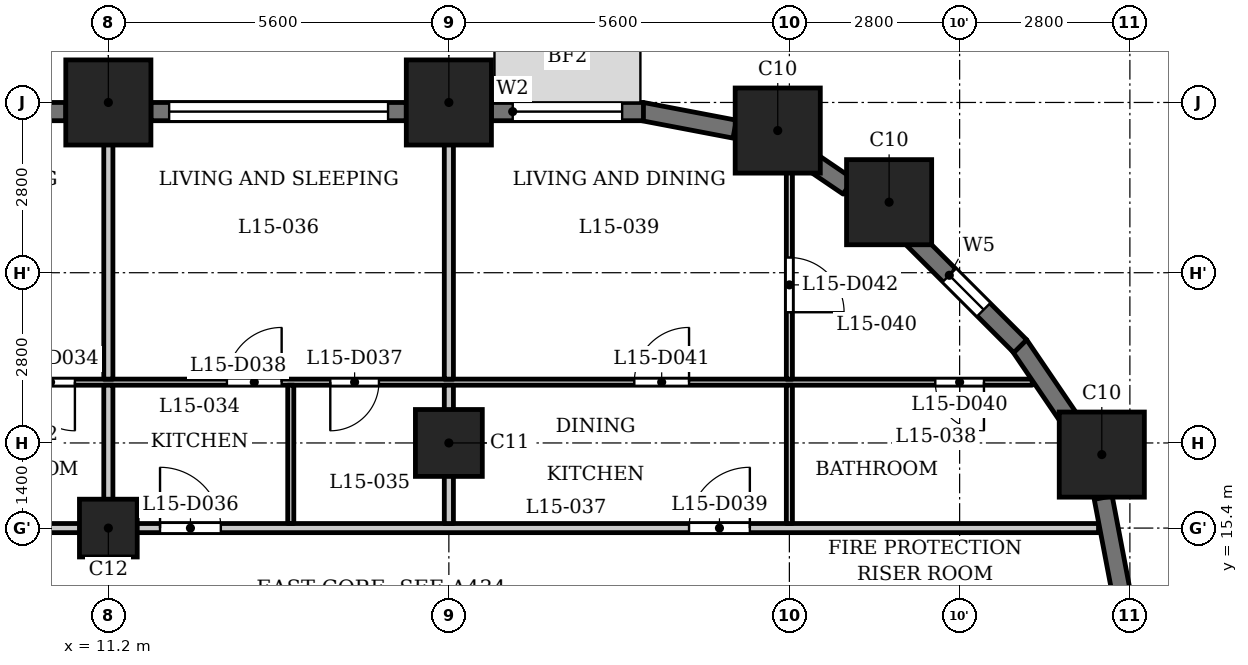
"""IFC4 building model, lengths in metres.
Left out: names, types, materials, properties, quantities, classifications, styles, units other than length and angle.
Written with IfcOpenShell. Run it as: python <this file> out.ifc"""

import sys

from ifc_helpers import new_model, si_unit, direction, frame, frame_2d, origin, origin_2d, place, context, subcontext, project, spatial, rectangle, extrude, element, fill, save


model = new_model("IFC4")
c1 = context("Model", 3, precision=1e-05, world=origin(), true_north=direction((0.0, 1.0)))
c2 = subcontext(c1, "Body", "Model", "MODEL_VIEW")
j1 = project(units=[si_unit("LENGTHUNIT", "METRE"), si_unit("PLANEANGLEUNIT", "RADIAN")], contexts=[c1])
p1 = place(None, origin())
s1 = spatial("IfcSite", under=j1, at=p1, CompositionType="ELEMENT")
p2 = place(p1, origin())
s2 = spatial("IfcBuilding", under=s1, at=p2, CompositionType="ELEMENT")
p3 = place(p2, frame((0.0, 0.0, 62.0)))
s3 = spatial("IfcBuildingStorey", under=s2, at=p3, CompositionType="ELEMENT", Elevation=62.0)
for number, where, z_axis, x_axis in (
    (1, (27.538, 16.609, 0.0), (0.0, 0.0, 1.0), (1.0, 0.0, 0.0)),
    (2, (24.04, 20.76, 0.0), (0.0, 0.0, 1.0), (1.0, 0.0, 0.0)),
    (3, (22.209, 21.938, 0.0), (0.0, 0.0, 1.0), (1.0, 0.0, 0.0)),
    (4, (16.8, 22.4, 0.0), (0.0, 0.0, 1.0), (1.0, 0.0, 0.0)),
    (5, (11.2, 22.4, 0.0), (0.0, 0.0, 1.0), (1.0, 0.0, 0.0)),
):
    element("IfcColumn", number, at=place(p3, frame(where, z_axis=z_axis, x_axis=x_axis)), inside=s3, PredefinedType="COLUMN", context=c2, shape_type="SweptSolid", body=[
        extrude(rectangle(XDim=1.4, YDim=1.4, at=origin_2d()), origin(), (0.0, 0.0, 1.0), 3.5),
    ])
p4 = place(p3, frame((16.8, 16.8, 0.0), z_axis=(0.0, 0.0, 1.0), x_axis=(1.0, 0.0, 0.0)))
e6 = element("IfcColumn", 6, at=p4, inside=s3, PredefinedType="COLUMN", context=c2, shape_type="SweptSolid", body=[
    extrude(rectangle(XDim=1.1, YDim=1.1, at=origin_2d()), origin(), (0.0, 0.0, 1.0), 3.5),
])
p5 = place(p3, frame((11.2, 15.4, 0.0), z_axis=(0.0, 0.0, 1.0), x_axis=(1.0, 0.0, 0.0)))
e7 = element("IfcColumn", 7, at=p5, inside=s3, PredefinedType="COLUMN", context=c2, shape_type="SweptSolid", body=[
    extrude(rectangle(XDim=0.95, YDim=0.95, at=origin_2d()), origin(), (0.0, 0.0, 1.0), 3.5),
])
for number, where, z_axis, x_axis in (
    (8, (27.853, 14.372, 0.0), (0.0, 0.0, 1.0), (-0.187, 0.982, 0.0)),
    (9, (27.053, 17.126, 0.0), (0.0, 0.0, 1.0), (-0.562, 0.827, 0.0)),
):
    element("IfcWall", number, at=place(p3, frame(where, z_axis=z_axis, x_axis=x_axis)), inside=s3, PredefinedType="SOLIDWALL", context=c2, shape_type="SweptSolid", body=[
        extrude(rectangle(XDim=1.556, YDim=0.3, at=frame_2d((0.778, 0.0))), origin(), (0.0, 0.0, 1.0), 2.35),
    ])
p6 = place(p3, frame((26.197, 18.391, 0.0), z_axis=(0.0, 0.0, 1.0), x_axis=(-0.707057949532, 0.707155609469, 0.0)))
e10 = element("IfcWall", 10, at=p6, inside=s3, PredefinedType="SOLIDWALL", context=c2, shape_type="SweptSolid", body=[
    extrude(rectangle(XDim=2.5, YDim=0.3, at=frame_2d((1.25, 0.0))), origin(), (0.0, 0.0, 1.0), 2.35),
])
p7 = place(p6, frame((0.85, 0.0, 0.6)))
e11 = element("IfcOpeningElement", 11, at=p7, cuts=e10, PredefinedType="OPENING", context=c2, shape_type="SweptSolid", body=[
    extrude(rectangle(XDim=0.8, YDim=1.55, at=frame_2d((0.4, 0.775))), frame((0.0, 0.16, 0.0), z_axis=(0.0, -1.0, 0.0), x_axis=(1.0, 0.0, 0.0)), (0.0, 0.0, 1.0), 0.32),
])
p8 = place(p3, frame((23.368, 21.017, 0.0), z_axis=(0.0, 0.0, 1.0), x_axis=(-0.827037530089, 0.562146710232, 0.0)))
e12 = element("IfcWall", 12, at=p8, inside=s3, PredefinedType="SOLIDWALL", context=c2, shape_type="SweptSolid", body=[
    extrude(rectangle(XDim=0.777, YDim=0.3, at=frame_2d((0.388, 0.0))), origin(), (0.0, 0.0, 1.0), 3.2),
])
p9 = place(p3, frame((21.5, 21.961, 0.0), z_axis=(0.0, 0.0, 1.0), x_axis=(-0.982297345734, 0.187328386968, 0.0)))
e13 = element("IfcWall", 13, at=p9, inside=s3, PredefinedType="SOLIDWALL", context=c2, shape_type="SweptSolid", body=[
    extrude(rectangle(XDim=1.556, YDim=0.3, at=frame_2d((0.778, 0.0))), origin(), (0.0, 0.0, 1.0), 2.35),
])
p10 = place(p3, frame((20.0, 22.25, 0.0), z_axis=(0.0, 0.0, 1.0), x_axis=(-1.0, 0.0, 0.0)))
e14 = element("IfcWall", 14, at=p10, inside=s3, PredefinedType="SOLIDWALL", context=c2, shape_type="SweptSolid", body=[
    extrude(rectangle(XDim=2.5, YDim=0.3, at=frame_2d((1.25, 0.0))), origin(), (0.0, 0.0, 1.0), 2.35),
])
p11 = place(p10, frame((0.35, 0.0, 0.9)))
e15 = element("IfcOpeningElement", 15, at=p11, cuts=e14, PredefinedType="OPENING", context=c2, shape_type="SweptSolid", body=[
    extrude(rectangle(XDim=1.8, YDim=1.25, at=frame_2d((0.9, 0.625))), frame((0.0, 0.16, 0.0), z_axis=(0.0, -1.0, 0.0), x_axis=(1.0, 0.0, 0.0)), (0.0, 0.0, 1.0), 0.32),
])
p12 = place(p3, frame((16.1, 22.25, 0.0), z_axis=(0.0, 0.0, 1.0), x_axis=(-1.0, 0.0, 0.0)))
e16 = element("IfcWall", 16, at=p12, inside=s3, PredefinedType="SOLIDWALL", context=c2, shape_type="SweptSolid", body=[
    extrude(rectangle(XDim=4.2, YDim=0.3, at=frame_2d((2.1, 0.0))), origin(), (0.0, 0.0, 1.0), 2.35),
])
p13 = place(p12, frame((0.3, 0.0, 1.2)))
e17 = element("IfcOpeningElement", 17, at=p13, cuts=e16, PredefinedType="OPENING", context=c2, shape_type="SweptSolid", body=[
    extrude(rectangle(XDim=3.6, YDim=0.95, at=frame_2d((1.8, 0.475))), frame((0.0, 0.16, 0.0), z_axis=(0.0, -1.0, 0.0), x_axis=(1.0, 0.0, 0.0)), (0.0, 0.0, 1.0), 0.32),
])
p14 = place(p3, frame((10.5, 22.25, 0.0), z_axis=(0.0, 0.0, 1.0), x_axis=(-1.0, 0.0, 0.0)))
e18 = element("IfcWall", 18, at=p14, inside=s3, PredefinedType="SOLIDWALL", context=c2, shape_type="SweptSolid", body=[
    extrude(rectangle(XDim=4.2, YDim=0.3, at=frame_2d((2.1, 0.0))), origin(), (0.0, 0.0, 1.0), 2.35),
])
p15 = place(p14, frame((0.3, 0.0, 1.2)))
e19 = element("IfcOpeningElement", 19, at=p15, cuts=e18, PredefinedType="OPENING", context=c2, shape_type="SweptSolid", body=[
    extrude(rectangle(XDim=3.6, YDim=0.95, at=frame_2d((1.8, 0.475))), frame((0.0, 0.16, 0.0), z_axis=(0.0, -1.0, 0.0), x_axis=(1.0, 0.0, 0.0)), (0.0, 0.0, 1.0), 0.32),
])
p16 = place(p3, frame((-27.484, 15.4, 0.0), z_axis=(0.0, 0.0, 1.0), x_axis=(1.0, 0.0, 0.0)))
e20 = element("IfcWall", 20, at=p16, inside=s3, PredefinedType="PARTITIONING", context=c2, shape_type="SweptSolid", body=[
    extrude(rectangle(XDim=54.968, YDim=0.15, at=frame_2d((27.484, 0.0))), origin(), (0.0, 0.0, 1.0), 3.2),
])
p17 = place(p16, frame((8.784, 0.0, 0.0)))
e21 = element("IfcOpeningElement", 21, at=p17, cuts=e20, PredefinedType="OPENING", context=c2, shape_type="SweptSolid", body=[
    extrude(rectangle(XDim=1.0, YDim=2.1, at=frame_2d((0.5, 1.05))), frame((0.0, 0.085, 0.0), z_axis=(0.0, -1.0, 0.0), x_axis=(1.0, 0.0, 0.0)), (0.0, 0.0, 1.0), 0.17),
])
p18 = place(p16, frame((14.634, 0.0, 0.0)))
e22 = element("IfcOpeningElement", 22, at=p18, cuts=e20, PredefinedType="OPENING", context=c2, shape_type="SweptSolid", body=[
    extrude(rectangle(XDim=1.0, YDim=2.1, at=frame_2d((0.5, 1.05))), frame((0.0, 0.085, 0.0), z_axis=(0.0, -1.0, 0.0), x_axis=(1.0, 0.0, 0.0)), (0.0, 0.0, 1.0), 0.17),
])
p19 = place(p16, frame((19.484, 0.0, 0.0)))
e23 = element("IfcOpeningElement", 23, at=p19, cuts=e20, PredefinedType="OPENING", context=c2, shape_type="SweptSolid", body=[
    extrude(rectangle(XDim=1.0, YDim=2.1, at=frame_2d((0.5, 1.05))), frame((0.0, 0.085, 0.0), z_axis=(0.0, -1.0, 0.0), x_axis=(1.0, 0.0, 0.0)), (0.0, 0.0, 1.0), 0.17),
])
p20 = place(p16, frame((23.634, 0.0, 0.0)))
e24 = element("IfcOpeningElement", 24, at=p20, cuts=e20, PredefinedType="OPENING", context=c2, shape_type="SweptSolid", body=[
    extrude(rectangle(XDim=1.0, YDim=2.1, at=frame_2d((0.5, 1.05))), frame((0.0, 0.085, 0.0), z_axis=(0.0, -1.0, 0.0), x_axis=(1.0, 0.0, 0.0)), (0.0, 0.0, 1.0), 0.17),
])
p21 = place(p16, frame((28.234, 0.0, 0.0)))
e25 = element("IfcOpeningElement", 25, at=p21, cuts=e20, PredefinedType="OPENING", context=c2, shape_type="SweptSolid", body=[
    extrude(rectangle(XDim=1.0, YDim=2.1, at=frame_2d((0.5, 1.05))), frame((0.0, 0.085, 0.0), z_axis=(0.0, -1.0, 0.0), x_axis=(1.0, 0.0, 0.0)), (0.0, 0.0, 1.0), 0.17),
])
p22 = place(p16, frame((33.784, 0.0, 0.0)))
e26 = element("IfcOpeningElement", 26, at=p22, cuts=e20, PredefinedType="OPENING", context=c2, shape_type="SweptSolid", body=[
    extrude(rectangle(XDim=1.0, YDim=2.1, at=frame_2d((0.5, 1.05))), frame((0.0, 0.085, 0.0), z_axis=(0.0, -1.0, 0.0), x_axis=(1.0, 0.0, 0.0)), (0.0, 0.0, 1.0), 0.17),
])
p23 = place(p16, frame((39.534, 0.0, 0.0)))
e27 = element("IfcOpeningElement", 27, at=p23, cuts=e20, PredefinedType="OPENING", context=c2, shape_type="SweptSolid", body=[
    extrude(rectangle(XDim=1.0, YDim=2.1, at=frame_2d((0.5, 1.05))), frame((0.0, 0.085, 0.0), z_axis=(0.0, -1.0, 0.0), x_axis=(1.0, 0.0, 0.0)), (0.0, 0.0, 1.0), 0.17),
])
p24 = place(p16, frame((48.234, 0.0, 0.0)))
e28 = element("IfcOpeningElement", 28, at=p24, cuts=e20, PredefinedType="OPENING", context=c2, shape_type="SweptSolid", body=[
    extrude(rectangle(XDim=1.0, YDim=2.1, at=frame_2d((0.5, 1.05))), frame((0.0, 0.085, 0.0), z_axis=(0.0, -1.0, 0.0), x_axis=(1.0, 0.0, 0.0)), (0.0, 0.0, 1.0), 0.17),
])
p25 = place(p3, frame((-26.64, 17.8, 0.0), z_axis=(0.0, 0.0, 1.0), x_axis=(1.0, 0.0, 0.0)))
e29 = element("IfcWall", 29, at=p25, inside=s3, PredefinedType="PARTITIONING", context=c2, shape_type="SweptSolid", body=[
    extrude(rectangle(XDim=53.034, YDim=0.1, at=frame_2d((26.517, 0.0))), origin(), (0.0, 0.0, 1.0), 3.2),
])
p26 = place(p25, frame((2.872, 0.0, 0.0)))
e30 = element("IfcOpeningElement", 30, at=p26, cuts=e29, PredefinedType="OPENING", context=c2, shape_type="SweptSolid", body=[
    extrude(rectangle(XDim=0.8, YDim=2.1, at=frame_2d((0.4, 1.05))), frame((0.0, 0.06, 0.0), z_axis=(0.0, -1.0, 0.0), x_axis=(1.0, 0.0, 0.0)), (0.0, 0.0, 1.0), 0.12),
])
p27 = place(p25, frame((7.04, 0.0, 0.0)))
e31 = element("IfcOpeningElement", 31, at=p27, cuts=e29, PredefinedType="OPENING", context=c2, shape_type="SweptSolid", body=[
    extrude(rectangle(XDim=0.9, YDim=2.1, at=frame_2d((0.45, 1.05))), frame((0.0, 0.06, 0.0), z_axis=(0.0, -1.0, 0.0), x_axis=(1.0, 0.0, 0.0)), (0.0, 0.0, 1.0), 0.12),
])
p28 = place(p25, frame((10.74, 0.0, 0.0)))
e32 = element("IfcOpeningElement", 32, at=p28, cuts=e29, PredefinedType="OPENING", context=c2, shape_type="SweptSolid", body=[
    extrude(rectangle(XDim=0.8, YDim=2.1, at=frame_2d((0.4, 1.05))), frame((0.0, 0.06, 0.0), z_axis=(0.0, -1.0, 0.0), x_axis=(1.0, 0.0, 0.0)), (0.0, 0.0, 1.0), 0.12),
])
p29 = place(p25, frame((12.89, 0.0, 0.0)))
e33 = element("IfcOpeningElement", 33, at=p29, cuts=e29, PredefinedType="OPENING", context=c2, shape_type="SweptSolid", body=[
    extrude(rectangle(XDim=0.9, YDim=2.1, at=frame_2d((0.45, 1.05))), frame((0.0, 0.06, 0.0), z_axis=(0.0, -1.0, 0.0), x_axis=(1.0, 0.0, 0.0)), (0.0, 0.0, 1.0), 0.12),
])
p30 = place(p25, frame((16.34, 0.0, 0.0)))
e34 = element("IfcOpeningElement", 34, at=p30, cuts=e29, PredefinedType="OPENING", context=c2, shape_type="SweptSolid", body=[
    extrude(rectangle(XDim=0.8, YDim=2.1, at=frame_2d((0.4, 1.05))), frame((0.0, 0.06, 0.0), z_axis=(0.0, -1.0, 0.0), x_axis=(1.0, 0.0, 0.0)), (0.0, 0.0, 1.0), 0.12),
])
p31 = place(p25, frame((19.74, 0.0, 0.0)))
e35 = element("IfcOpeningElement", 35, at=p31, cuts=e29, PredefinedType="OPENING", context=c2, shape_type="SweptSolid", body=[
    extrude(rectangle(XDim=0.9, YDim=2.1, at=frame_2d((0.45, 1.05))), frame((0.0, 0.06, 0.0), z_axis=(0.0, -1.0, 0.0), x_axis=(1.0, 0.0, 0.0)), (0.0, 0.0, 1.0), 0.12),
])
p32 = place(p25, frame((25.09, 0.0, 0.0)))
e36 = element("IfcOpeningElement", 36, at=p32, cuts=e29, PredefinedType="OPENING", context=c2, shape_type="SweptSolid", body=[
    extrude(rectangle(XDim=0.8, YDim=2.1, at=frame_2d((0.4, 1.05))), frame((0.0, 0.06, 0.0), z_axis=(0.0, -1.0, 0.0), x_axis=(1.0, 0.0, 0.0)), (0.0, 0.0, 1.0), 0.12),
])
p33 = place(p25, frame((21.89, 0.0, 0.0)))
e37 = element("IfcOpeningElement", 37, at=p33, cuts=e29, PredefinedType="OPENING", context=c2, shape_type="SweptSolid", body=[
    extrude(rectangle(XDim=0.9, YDim=2.1, at=frame_2d((0.45, 1.05))), frame((0.0, 0.06, 0.0), z_axis=(0.0, -1.0, 0.0), x_axis=(1.0, 0.0, 0.0)), (0.0, 0.0, 1.0), 0.12),
])
p34 = place(p25, frame((30.69, 0.0, 0.0)))
e38 = element("IfcOpeningElement", 38, at=p34, cuts=e29, PredefinedType="OPENING", context=c2, shape_type="SweptSolid", body=[
    extrude(rectangle(XDim=0.8, YDim=2.1, at=frame_2d((0.4, 1.05))), frame((0.0, 0.06, 0.0), z_axis=(0.0, -1.0, 0.0), x_axis=(1.0, 0.0, 0.0)), (0.0, 0.0, 1.0), 0.12),
])
p35 = place(p25, frame((28.49, 0.0, 0.0)))
e39 = element("IfcOpeningElement", 39, at=p35, cuts=e29, PredefinedType="OPENING", context=c2, shape_type="SweptSolid", body=[
    extrude(rectangle(XDim=0.9, YDim=2.1, at=frame_2d((0.45, 1.05))), frame((0.0, 0.06, 0.0), z_axis=(0.0, -1.0, 0.0), x_axis=(1.0, 0.0, 0.0)), (0.0, 0.0, 1.0), 0.12),
])
p36 = place(p25, frame((36.49, 0.0, 0.0)))
e40 = element("IfcOpeningElement", 40, at=p36, cuts=e29, PredefinedType="OPENING", context=c2, shape_type="SweptSolid", body=[
    extrude(rectangle(XDim=0.8, YDim=2.1, at=frame_2d((0.4, 1.05))), frame((0.0, 0.06, 0.0), z_axis=(0.0, -1.0, 0.0), x_axis=(1.0, 0.0, 0.0)), (0.0, 0.0, 1.0), 0.12),
])
p37 = place(p25, frame((33.04, 0.0, 0.0)))
e41 = element("IfcOpeningElement", 41, at=p37, cuts=e29, PredefinedType="OPENING", context=c2, shape_type="SweptSolid", body=[
    extrude(rectangle(XDim=0.9, YDim=2.1, at=frame_2d((0.45, 1.05))), frame((0.0, 0.06, 0.0), z_axis=(0.0, -1.0, 0.0), x_axis=(1.0, 0.0, 0.0)), (0.0, 0.0, 1.0), 0.12),
])
p38 = place(p25, frame((41.49, 0.0, 0.0)))
e42 = element("IfcOpeningElement", 42, at=p38, cuts=e29, PredefinedType="OPENING", context=c2, shape_type="SweptSolid", body=[
    extrude(rectangle(XDim=0.8, YDim=2.1, at=frame_2d((0.4, 1.05))), frame((0.0, 0.06, 0.0), z_axis=(0.0, -1.0, 0.0), x_axis=(1.0, 0.0, 0.0)), (0.0, 0.0, 1.0), 0.12),
])
p39 = place(p25, frame((39.79, 0.0, 0.0)))
e43 = element("IfcOpeningElement", 43, at=p39, cuts=e29, PredefinedType="OPENING", context=c2, shape_type="SweptSolid", body=[
    extrude(rectangle(XDim=0.9, YDim=2.1, at=frame_2d((0.45, 1.05))), frame((0.0, 0.06, 0.0), z_axis=(0.0, -1.0, 0.0), x_axis=(1.0, 0.0, 0.0)), (0.0, 0.0, 1.0), 0.12),
])
p40 = place(p25, frame((51.44, 0.0, 0.0)))
e44 = element("IfcOpeningElement", 44, at=p40, cuts=e29, PredefinedType="OPENING", context=c2, shape_type="SweptSolid", body=[
    extrude(rectangle(XDim=0.8, YDim=2.1, at=frame_2d((0.4, 1.05))), frame((0.0, 0.06, 0.0), z_axis=(0.0, -1.0, 0.0), x_axis=(1.0, 0.0, 0.0)), (0.0, 0.0, 1.0), 0.12),
])
p41 = place(p25, frame((46.49, 0.0, 0.0)))
e45 = element("IfcOpeningElement", 45, at=p41, cuts=e29, PredefinedType="OPENING", context=c2, shape_type="SweptSolid", body=[
    extrude(rectangle(XDim=0.9, YDim=2.1, at=frame_2d((0.45, 1.05))), frame((0.0, 0.06, 0.0), z_axis=(0.0, -1.0, 0.0), x_axis=(1.0, 0.0, 0.0)), (0.0, 0.0, 1.0), 0.12),
])
p42 = place(p3, frame((11.2, 15.475, 0.0), z_axis=(0.0, 0.0, 1.0), x_axis=(0.0, 1.0, 0.0)))
e46 = element("IfcWall", 46, at=p42, inside=s3, PredefinedType="PARTITIONING", context=c2, shape_type="SweptSolid", body=[
    extrude(rectangle(XDim=2.275, YDim=0.15, at=frame_2d((1.137, 0.0))), origin(), (0.0, 0.0, 1.0), 3.2),
])
p43 = place(p3, frame((11.2, 17.85, 0.0), z_axis=(0.0, 0.0, 1.0), x_axis=(0.0, 1.0, 0.0)))
e47 = element("IfcWall", 47, at=p43, inside=s3, PredefinedType="PARTITIONING", context=c2, shape_type="SweptSolid", body=[
    extrude(rectangle(XDim=5.23, YDim=0.15, at=frame_2d((2.615, 0.0))), origin(), (0.0, 0.0, 1.0), 3.2),
])
p44 = place(p3, frame((14.2, 15.475, 0.0), z_axis=(0.0, 0.0, 1.0), x_axis=(0.0, 1.0, 0.0)))
e48 = element("IfcWall", 48, at=p44, inside=s3, PredefinedType="PARTITIONING", context=c2, shape_type="SweptSolid", body=[
    extrude(rectangle(XDim=2.275, YDim=0.1, at=frame_2d((1.137, 0.0))), origin(), (0.0, 0.0, 1.0), 3.2),
])
p45 = place(p3, frame((16.8, 15.475, 0.0), z_axis=(0.0, 0.0, 1.0), x_axis=(0.0, 1.0, 0.0)))
e49 = element("IfcWall", 49, at=p45, inside=s3, PredefinedType="PARTITIONING", context=c2, shape_type="SweptSolid", body=[
    extrude(rectangle(XDim=2.275, YDim=0.15, at=frame_2d((1.137, 0.0))), origin(), (0.0, 0.0, 1.0), 3.2),
])
p46 = place(p3, frame((16.8, 17.85, 0.0), z_axis=(0.0, 0.0, 1.0), x_axis=(0.0, 1.0, 0.0)))
e50 = element("IfcWall", 50, at=p46, inside=s3, PredefinedType="PARTITIONING", context=c2, shape_type="SweptSolid", body=[
    extrude(rectangle(XDim=5.23, YDim=0.15, at=frame_2d((2.615, 0.0))), origin(), (0.0, 0.0, 1.0), 3.2),
])
p47 = place(p3, frame((22.4, 15.475, 0.0), z_axis=(0.0, 0.0, 1.0), x_axis=(0.0, 1.0, 0.0)))
e51 = element("IfcWall", 51, at=p47, inside=s3, PredefinedType="PARTITIONING", context=c2, shape_type="SweptSolid", body=[
    extrude(rectangle(XDim=2.275, YDim=0.1, at=frame_2d((1.137, 0.0))), origin(), (0.0, 0.0, 1.0), 3.2),
])
p48 = place(p3, frame((22.4, 17.85, 0.0), z_axis=(0.0, 0.0, 1.0), x_axis=(0.0, 1.0, 0.0)))
e52 = element("IfcWall", 52, at=p48, inside=s3, PredefinedType="PARTITIONING", context=c2, shape_type="SweptSolid", body=[
    extrude(rectangle(XDim=3.87, YDim=0.1, at=frame_2d((1.935, 0.0))), origin(), (0.0, 0.0, 1.0), 3.2),
])
p49 = place(p48, frame((1.1, 0.0, 0.0)))
e53 = element("IfcOpeningElement", 53, at=p49, cuts=e52, PredefinedType="OPENING", context=c2, shape_type="SweptSolid", body=[
    extrude(rectangle(XDim=0.9, YDim=2.1, at=frame_2d((0.45, 1.05))), frame((0.0, 0.06, 0.0), z_axis=(0.0, -1.0, 0.0), x_axis=(1.0, 0.0, 0.0)), (0.0, 0.0, 1.0), 0.12),
])
p50 = place(p36, origin())
e54 = element("IfcDoor", 54, at=p50, inside=s3, OperationType="SINGLE_SWING_RIGHT", PredefinedType="DOOR", context=c2, shape_type="SweptSolid", body=[
    extrude(rectangle(XDim=0.8, YDim=2.1, at=frame_2d((0.4, 1.05))), frame((0.0, 0.025, 0.0), z_axis=(0.0, -1.0, 0.0), x_axis=(1.0, 0.0, 0.0)), (0.0, 0.0, 1.0), 0.05),
])
fill(e40, e54)
p51 = place(p23, origin())
e55 = element("IfcDoor", 55, at=p51, inside=s3, OperationType="SINGLE_SWING_RIGHT", PredefinedType="DOOR", context=c2, shape_type="SweptSolid", body=[
    extrude(rectangle(XDim=1.0, YDim=2.1, at=frame_2d((0.5, 1.05))), frame((0.0, 0.025, 0.0), z_axis=(0.0, -1.0, 0.0), x_axis=(1.0, 0.0, 0.0)), (0.0, 0.0, 1.0), 0.05),
])
fill(e27, e55)
p52 = place(p38, origin())
e56 = element("IfcDoor", 56, at=p52, inside=s3, OperationType="SINGLE_SWING_LEFT", PredefinedType="DOOR", context=c2, shape_type="SweptSolid", body=[
    extrude(rectangle(XDim=0.8, YDim=2.1, at=frame_2d((0.4, 1.05))), frame((0.0, 0.025, 0.0), z_axis=(0.0, -1.0, 0.0), x_axis=(1.0, 0.0, 0.0)), (0.0, 0.0, 1.0), 0.05),
])
fill(e42, e56)
p53 = place(p39, origin())
e57 = element("IfcDoor", 57, at=p53, inside=s3, OperationType="SINGLE_SWING_LEFT", PredefinedType="DOOR", context=c2, shape_type="SweptSolid", body=[
    extrude(rectangle(XDim=0.9, YDim=2.1, at=frame_2d((0.45, 1.05))), frame((0.0, 0.025, 0.0), z_axis=(0.0, -1.0, 0.0), x_axis=(1.0, 0.0, 0.0)), (0.0, 0.0, 1.0), 0.05),
])
fill(e43, e57)
p54 = place(p24, origin())
e58 = element("IfcDoor", 58, at=p54, inside=s3, OperationType="SINGLE_SWING_LEFT", PredefinedType="DOOR", context=c2, shape_type="SweptSolid", body=[
    extrude(rectangle(XDim=1.0, YDim=2.1, at=frame_2d((0.5, 1.05))), frame((0.0, 0.025, 0.0), z_axis=(0.0, -1.0, 0.0), x_axis=(1.0, 0.0, 0.0)), (0.0, 0.0, 1.0), 0.05),
])
fill(e28, e58)
p55 = place(p40, origin())
e59 = element("IfcDoor", 59, at=p55, inside=s3, OperationType="SINGLE_SWING_RIGHT", PredefinedType="DOOR", context=c2, shape_type="SweptSolid", body=[
    extrude(rectangle(XDim=0.8, YDim=2.1, at=frame_2d((0.4, 1.05))), frame((0.0, 0.025, 0.0), z_axis=(0.0, -1.0, 0.0), x_axis=(1.0, 0.0, 0.0)), (0.0, 0.0, 1.0), 0.05),
])
fill(e44, e59)
p56 = place(p41, origin())
e60 = element("IfcDoor", 60, at=p56, inside=s3, OperationType="SINGLE_SWING_LEFT", PredefinedType="DOOR", context=c2, shape_type="SweptSolid", body=[
    extrude(rectangle(XDim=0.9, YDim=2.1, at=frame_2d((0.45, 1.05))), frame((0.0, 0.025, 0.0), z_axis=(0.0, -1.0, 0.0), x_axis=(1.0, 0.0, 0.0)), (0.0, 0.0, 1.0), 0.05),
])
fill(e45, e60)
p57 = place(p49, origin())
e61 = element("IfcDoor", 61, at=p57, inside=s3, OperationType="SINGLE_SWING_LEFT", PredefinedType="DOOR", context=c2, shape_type="SweptSolid", body=[
    extrude(rectangle(XDim=0.9, YDim=2.1, at=frame_2d((0.45, 1.05))), frame((0.0, 0.025, 0.0), z_axis=(0.0, -1.0, 0.0), x_axis=(1.0, 0.0, 0.0)), (0.0, 0.0, 1.0), 0.05),
])
fill(e53, e61)
p58 = place(p7, origin())
e62 = element("IfcWindow", 62, at=p58, inside=s3, PartitioningType="SINGLE_PANEL", PredefinedType="WINDOW", context=c2, shape_type="SweptSolid", body=[
    extrude(rectangle(XDim=0.8, YDim=1.55, at=frame_2d((0.4, 0.775))), frame((0.0, 0.03, 0.0), z_axis=(0.0, -1.0, 0.0), x_axis=(1.0, 0.0, 0.0)), (0.0, 0.0, 1.0), 0.06),
])
fill(e11, e62)
p59 = place(p11, origin())
e63 = element("IfcWindow", 63, at=p59, inside=s3, PartitioningType="SINGLE_PANEL", PredefinedType="WINDOW", context=c2, shape_type="SweptSolid", body=[
    extrude(rectangle(XDim=1.8, YDim=1.25, at=frame_2d((0.9, 0.625))), frame((0.0, 0.03, 0.0), z_axis=(0.0, -1.0, 0.0), x_axis=(1.0, 0.0, 0.0)), (0.0, 0.0, 1.0), 0.06),
])
fill(e15, e63)
p60 = place(p13, origin())
e64 = element("IfcWindow", 64, at=p60, inside=s3, PartitioningType="SINGLE_PANEL", PredefinedType="WINDOW", context=c2, shape_type="SweptSolid", body=[
    extrude(rectangle(XDim=3.6, YDim=0.95, at=frame_2d((1.8, 0.475))), frame((0.0, 0.03, 0.0), z_axis=(0.0, -1.0, 0.0), x_axis=(1.0, 0.0, 0.0)), (0.0, 0.0, 1.0), 0.06),
])
fill(e17, e64)
save(model, sys.argv[1])
